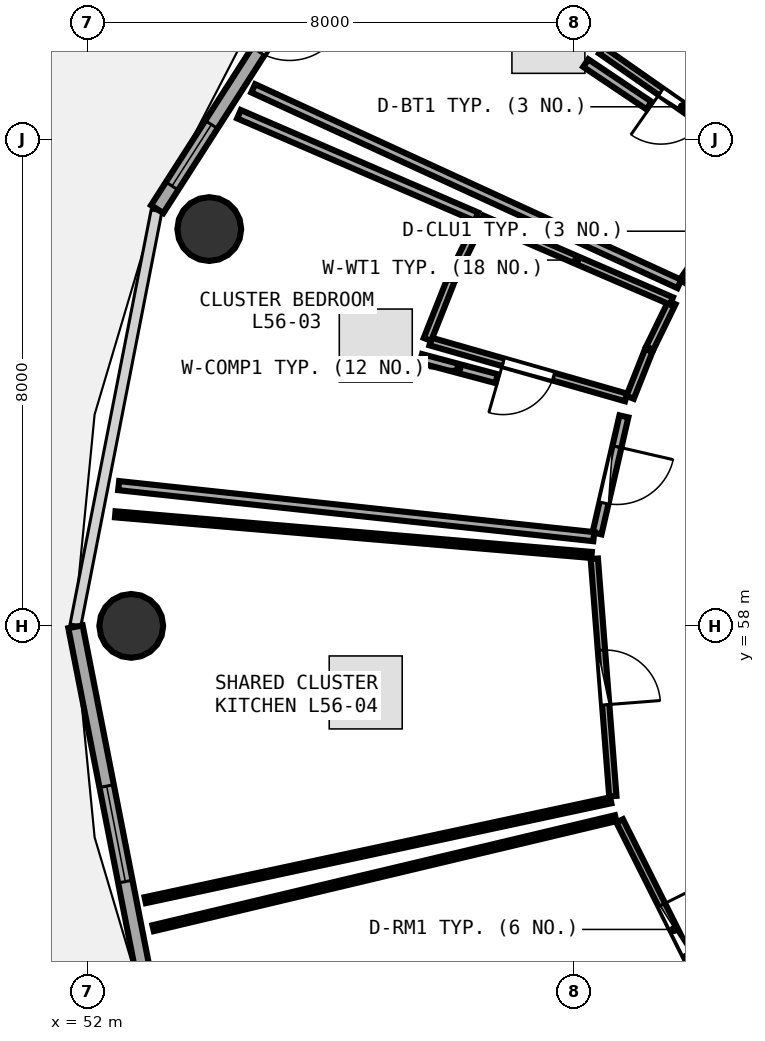
"""IFC4 building model, lengths in metres.
Left out: names, types, materials, properties, quantities, classifications, styles, units other than length and angle.
Written with IfcOpenShell. Run it as: python <this file> out.ifc"""

import sys

from ifc_helpers import new_model, si_unit, direction, frame, frame_2d, origin, origin_2d, place, context, subcontext, project, spatial, rectangle, circle, extrude, element, fill, save


model = new_model("IFC4")
c1 = context("Model", 3, precision=1e-05, world=origin(), true_north=direction((0.0, 1.0)))
c2 = subcontext(c1, "Body", "Model", "MODEL_VIEW")
j1 = project(units=[si_unit("LENGTHUNIT", "METRE"), si_unit("PLANEANGLEUNIT", "RADIAN")], contexts=[c1])
p1 = place(None, origin())
s1 = spatial("IfcSite", under=j1, at=p1, CompositionType="ELEMENT")
p2 = place(p1, origin())
s2 = spatial("IfcBuilding", under=s1, at=p2, CompositionType="ELEMENT")
p3 = place(p2, frame((0.0, 0.0, 219.45)))
s3 = spatial("IfcBuildingStorey", under=s2, at=p3, CompositionType="ELEMENT", Elevation=219.45)
for number, where, z_axis, x_axis in (
    (1, (54.003, 64.526, 0.0), (0.0, 0.0, 1.0), (1.0, 0.0, 0.0)),
    (2, (52.72, 58.0, 0.0), (0.0, 0.0, 1.0), (1.0, 0.0, 0.0)),
):
    element("IfcColumn", number, at=place(p3, frame(where, z_axis=z_axis, x_axis=x_axis)), inside=s3, PredefinedType="COLUMN", context=c2, shape_type="SweptSolid", body=[
        extrude(circle(Radius=0.525, at=origin_2d()), origin(), (0.0, 0.0, 1.0), 3.75),
    ])
p4 = place(p3, frame((56.986, 70.843, 0.0), z_axis=(0.0, 0.0, 1.0), x_axis=(-0.539539512973, -0.841960280501, 0.0)))
e3 = element("IfcWall", 3, at=p4, inside=s3, PredefinedType="SOLIDWALL", context=c2, shape_type="SweptSolid", body=[
    extrude(rectangle(XDim=7.115, YDim=0.24, at=frame_2d((3.557, 0.0))), origin(), (0.0, 0.0, 1.0), 3.475),
])
p5 = place(p4, frame((3.082, 0.0, 0.0)))
e4 = element("IfcOpeningElement", 4, at=p5, cuts=e3, PredefinedType="OPENING", context=c2, shape_type="SweptSolid", body=[
    extrude(rectangle(XDim=0.95, YDim=2.1, at=frame_2d((0.475, 1.05))), frame((0.0, 0.13, 0.0), z_axis=(0.0, -1.0, 0.0), x_axis=(1.0, 0.0, 0.0)), (0.0, 0.0, 1.0), 0.26),
])
p6 = place(p4, frame((5.462, 0.0, 0.85)))
e5 = element("IfcOpeningElement", 5, at=p6, cuts=e3, PredefinedType="OPENING", context=c2, shape_type="SweptSolid", body=[
    extrude(rectangle(XDim=1.2, YDim=1.45, at=frame_2d((0.6, 0.725))), frame((0.0, 0.13, 0.0), z_axis=(0.0, -1.0, 0.0), x_axis=(1.0, 0.0, 0.0)), (0.0, 0.0, 1.0), 0.26),
])
p7 = place(p3, frame((51.803, 57.985, 0.0), z_axis=(0.0, 0.0, 1.0), x_axis=(0.192069055673, -0.981381413036, 0.0)))
e6 = element("IfcWall", 6, at=p7, inside=s3, PredefinedType="SOLIDWALL", context=c2, shape_type="SweptSolid", body=[
    extrude(rectangle(XDim=6.94, YDim=0.24, at=frame_2d((3.47, 0.0))), origin(), (0.0, 0.0, 1.0), 3.475),
])
p8 = place(p7, frame((2.67, 0.0, 0.85)))
e7 = element("IfcOpeningElement", 7, at=p8, cuts=e6, PredefinedType="OPENING", context=c2, shape_type="SweptSolid", body=[
    extrude(rectangle(XDim=1.6, YDim=1.45, at=frame_2d((0.8, 0.725))), frame((0.0, 0.13, 0.0), z_axis=(0.0, -1.0, 0.0), x_axis=(1.0, 0.0, 0.0)), (0.0, 0.0, 1.0), 0.26),
])
p9 = place(p3, frame((63.115, 65.606, 0.0), z_axis=(0.0, 0.0, 1.0), x_axis=(-0.819768322712, 0.57269529165, 0.0)))
e8 = element("IfcWall", 8, at=p9, inside=s3, PredefinedType="PLUMBINGWALL", context=c2, shape_type="SweptSolid", body=[
    extrude(rectangle(XDim=3.248, YDim=0.13, at=frame_2d((1.624, 0.0))), origin(), (0.0, 0.0, 1.0), 3.175),
])
p10 = place(p9, frame((1.194, 0.0, 0.0)))
e9 = element("IfcOpeningElement", 9, at=p10, cuts=e8, PredefinedType="OPENING", context=c2, shape_type="SweptSolid", body=[
    extrude(rectangle(XDim=0.86, YDim=2.05, at=frame_2d((0.43, 1.025))), frame((0.0, 0.075, 0.0), z_axis=(0.0, -1.0, 0.0), x_axis=(1.0, 0.0, 0.0)), (0.0, 0.0, 1.0), 0.15),
])
p11 = place(p3, frame((62.963, 65.326, 0.0), z_axis=(0.0, 0.0, 1.0), x_axis=(-0.569634666298, -0.821898014933, 0.0)))
e10 = element("IfcWall", 10, at=p11, inside=s3, PredefinedType="PARTITIONING", context=c2, shape_type="SweptSolid", body=[
    extrude(rectangle(XDim=2.032, YDim=0.15, at=frame_2d((1.016, 0.0))), origin(), (0.0, 0.0, 1.0), 3.025),
])
p12 = place(p11, frame((0.541, 0.0, 0.0)))
e11 = element("IfcOpeningElement", 11, at=p12, cuts=e10, PredefinedType="OPENING", context=c2, shape_type="SweptSolid", body=[
    extrude(rectangle(XDim=0.95, YDim=2.08, at=frame_2d((0.475, 1.04))), frame((0.0, 0.085, 0.0), z_axis=(0.0, -1.0, 0.0), x_axis=(1.0, 0.0, 0.0)), (0.0, 0.0, 1.0), 0.17),
])
p13 = place(p3, frame((60.859, 61.757, 0.0), z_axis=(0.0, 0.0, 1.0), x_axis=(-0.961479890051, 0.274875282679, 0.0)))
e12 = element("IfcWall", 12, at=p13, inside=s3, PredefinedType="PLUMBINGWALL", context=c2, shape_type="SweptSolid", body=[
    extrude(rectangle(XDim=3.347, YDim=0.13, at=frame_2d((1.673, 0.0))), origin(), (0.0, 0.0, 1.0), 3.175),
])
p14 = place(p13, frame((1.243, 0.0, 0.0)))
e13 = element("IfcOpeningElement", 13, at=p14, cuts=e12, PredefinedType="OPENING", context=c2, shape_type="SweptSolid", body=[
    extrude(rectangle(XDim=0.86, YDim=2.05, at=frame_2d((0.43, 1.025))), frame((0.0, 0.075, 0.0), z_axis=(0.0, -1.0, 0.0), x_axis=(1.0, 0.0, 0.0)), (0.0, 0.0, 1.0), 0.15),
])
p15 = place(p3, frame((60.823, 61.446, 0.0), z_axis=(0.0, 0.0, 1.0), x_axis=(-0.223956243079, -0.97459920028, 0.0)))
e14 = element("IfcWall", 14, at=p15, inside=s3, PredefinedType="PARTITIONING", context=c2, shape_type="SweptSolid", body=[
    extrude(rectangle(XDim=1.974, YDim=0.15, at=frame_2d((0.987, 0.0))), origin(), (0.0, 0.0, 1.0), 3.48),
])
p16 = place(p15, frame((0.512, 0.0, 0.0)))
e15 = element("IfcOpeningElement", 15, at=p16, cuts=e14, PredefinedType="OPENING", context=c2, shape_type="SweptSolid", body=[
    extrude(rectangle(XDim=0.95, YDim=2.08, at=frame_2d((0.475, 1.04))), frame((0.0, 0.085, 0.0), z_axis=(0.0, -1.0, 0.0), x_axis=(1.0, 0.0, 0.0)), (0.0, 0.0, 1.0), 0.17),
])
p17 = place(p3, frame((60.336, 59.103, 0.0), z_axis=(0.0, 0.0, 1.0), x_axis=(0.07781697677, -0.996967661525, 0.0)))
e16 = element("IfcWall", 16, at=p17, inside=s3, PredefinedType="PARTITIONING", context=c2, shape_type="SweptSolid", body=[
    extrude(rectangle(XDim=3.916, YDim=0.12, at=frame_2d((1.958, 0.0))), origin(), (0.0, 0.0, 1.0), 3.025),
])
p18 = place(p17, frame((1.508, 0.0, 0.0)))
e17 = element("IfcOpeningElement", 17, at=p18, cuts=e16, PredefinedType="OPENING", context=c2, shape_type="SweptSolid", body=[
    extrude(rectangle(XDim=0.9, YDim=2.08, at=frame_2d((0.45, 1.04))), frame((0.0, 0.07, 0.0), z_axis=(0.0, -1.0, 0.0), x_axis=(1.0, 0.0, 0.0)), (0.0, 0.0, 1.0), 0.14),
])
p19 = place(p3, frame((60.753, 54.793, 0.0), z_axis=(0.0, 0.0, 1.0), x_axis=(0.448191244457, -0.893937698272, 0.0)))
e18 = element("IfcWall", 18, at=p19, inside=s3, PredefinedType="PARTITIONING", context=c2, shape_type="SweptSolid", body=[
    extrude(rectangle(XDim=3.994, YDim=0.12, at=frame_2d((1.997, 0.0))), origin(), (0.0, 0.0, 1.0), 3.025),
])
p20 = place(p19, frame((1.547, 0.0, 0.0)))
e19 = element("IfcOpeningElement", 19, at=p20, cuts=e18, PredefinedType="OPENING", context=c2, shape_type="SweptSolid", body=[
    extrude(rectangle(XDim=0.9, YDim=2.08, at=frame_2d((0.45, 1.04))), frame((0.0, 0.07, 0.0), z_axis=(0.0, -1.0, 0.0), x_axis=(1.0, 0.0, 0.0)), (0.0, 0.0, 1.0), 0.14),
])
p21 = place(p3, frame((64.655, 67.085, 0.0), z_axis=(0.0, 0.0, 1.0), x_axis=(-0.716418161924, 0.697671138335, 0.0)))
e20 = element("IfcWall", 20, at=p21, inside=s3, PredefinedType="PARTITIONING", context=c2, shape_type="SweptSolid", body=[
    extrude(rectangle(XDim=7.449, YDim=0.15, at=frame_2d((3.725, 0.0))), origin(), (0.0, 0.0, 1.0), 3.075),
])
p22 = place(p3, frame((61.735, 63.623, 0.0), z_axis=(0.0, 0.0, 1.0), x_axis=(-0.908799831152, 0.417232389561, 0.0)))
e21 = element("IfcWall", 21, at=p22, inside=s3, PredefinedType="PARTITIONING", context=c2, shape_type="SweptSolid", body=[
    extrude(rectangle(XDim=7.712, YDim=0.15, at=frame_2d((3.856, 0.0))), origin(), (0.0, 0.0, 1.0), 3.025),
])
p23 = place(p3, frame((60.195, 67.256, 0.0), z_axis=(0.0, 0.0, 1.0), x_axis=(0.830279043522, -0.557347925347, 0.0)))
e22 = element("IfcWall", 22, at=p23, inside=s3, PredefinedType="PARTITIONING", context=c2, shape_type="SweptSolid", body=[
    extrude(rectangle(XDim=1.254, YDim=0.15, at=frame_2d((0.627, 0.0))), origin(), (0.0, 0.0, 1.0), 3.175),
])
p24 = place(p3, frame((61.613, 63.318, 0.0), z_axis=(0.0, 0.0, 1.0), x_axis=(-0.437484879269, -0.899225767208, 0.0)))
e23 = element("IfcWall", 23, at=p24, inside=s3, PredefinedType="PLUMBINGWALL", context=c2, shape_type="SweptSolid", body=[
    extrude(rectangle(XDim=0.835, YDim=0.13, at=frame_2d((0.418, 0.0))), origin(), (0.0, 0.0, 1.0), 3.235),
])
p25 = place(p3, frame((61.232, 62.531, 0.0), z_axis=(0.0, 0.0, 1.0), x_axis=(-0.369921104598, -0.929063171358, 0.0)))
e24 = element("IfcWall", 24, at=p25, inside=s3, PredefinedType="PLUMBINGWALL", context=c2, shape_type="SweptSolid", body=[
    extrude(rectangle(XDim=0.831, YDim=0.13, at=frame_2d((0.416, 0.0))), origin(), (0.0, 0.0, 1.0), 3.235),
])
p26 = place(p3, frame((57.591, 62.712, 0.0), z_axis=(0.0, 0.0, 1.0), x_axis=(0.368988727478, 0.929433870157, 0.0)))
e25 = element("IfcWall", 25, at=p26, inside=s3, PredefinedType="PLUMBINGWALL", context=c2, shape_type="SweptSolid", body=[
    extrude(rectangle(XDim=1.052, YDim=0.13, at=frame_2d((0.526, 0.0))), origin(), (0.0, 0.0, 1.0), 3.48),
])
p27 = place(p3, frame((57.996, 63.726, 0.0), z_axis=(0.0, 0.0, 1.0), x_axis=(0.438432715101, 0.898764014816, 0.0)))
e26 = element("IfcWall", 26, at=p27, inside=s3, PredefinedType="PLUMBINGWALL", context=c2, shape_type="SweptSolid", body=[
    extrude(rectangle(XDim=1.059, YDim=0.13, at=frame_2d((0.53, 0.0))), origin(), (0.0, 0.0, 1.0), 3.025),
])
p28 = place(p3, frame((58.487, 64.688, 0.0), z_axis=(0.0, 0.0, 1.0), x_axis=(0.918238400885, -0.396028078727, 0.0)))
e27 = element("IfcWall", 27, at=p28, inside=s3, PredefinedType="PLUMBINGWALL", context=c2, shape_type="SweptSolid", body=[
    extrude(rectangle(XDim=3.394, YDim=0.13, at=frame_2d((1.697, 0.0))), origin(), (0.0, 0.0, 1.0), 3.025),
])
p29 = place(p3, frame((60.327, 59.467, 0.0), z_axis=(0.0, 0.0, 1.0), x_axis=(-0.994280915129, 0.10679635673, 0.0)))
e28 = element("IfcWall", 28, at=p29, inside=s3, PredefinedType="PARTITIONING", context=c2, shape_type="SweptSolid", body=[
    extrude(rectangle(XDim=7.859, YDim=0.15, at=frame_2d((3.93, 0.0))), origin(), (0.0, 0.0, 1.0), 3.075),
])
p30 = place(p3, frame((54.492, 66.414, 0.0), z_axis=(0.0, 0.0, 1.0), x_axis=(0.918147334224, -0.396239160934, 0.0)))
e29 = element("IfcWall", 29, at=p30, inside=s3, PredefinedType="PARTITIONING", context=c2, shape_type="SweptSolid", body=[
    extrude(rectangle(XDim=4.253, YDim=0.15, at=frame_2d((2.126, 0.0))), origin(), (0.0, 0.0, 1.0), 3.025),
])
p31 = place(p3, frame((57.483, 62.398, 0.0), z_axis=(0.0, 0.0, 1.0), x_axis=(0.966263202112, -0.257556642788, 0.0)))
e30 = element("IfcWall", 30, at=p31, inside=s3, PredefinedType="PARTITIONING", context=c2, shape_type="SweptSolid", body=[
    extrude(rectangle(XDim=1.29, YDim=0.15, at=frame_2d((0.645, 0.0))), origin(), (0.0, 0.0, 1.0), 3.175),
])
p32 = place(p3, frame((60.606, 55.132, 0.0), z_axis=(0.0, 0.0, 1.0), x_axis=(-0.977761328162, -0.209720731335, 0.0)))
e31 = element("IfcWall", 31, at=p32, inside=s3, PredefinedType="PARTITIONING", context=c2, shape_type="SweptSolid", body=[
    extrude(rectangle(XDim=7.83, YDim=0.1, at=frame_2d((3.915, 0.0))), origin(), (0.0, 0.0, 1.0), 3.075),
])
p33 = place(p3, frame((52.457, 59.835, 0.0), z_axis=(0.0, 0.0, 1.0), x_axis=(0.996382192496, -0.084985448623, 0.0)))
e32 = element("IfcWall", 32, at=p33, inside=s3, PredefinedType="PARTITIONING", context=c2, shape_type="SweptSolid", body=[
    extrude(rectangle(XDim=7.863, YDim=0.1, at=frame_2d((3.931, 0.0))), origin(), (0.0, 0.0, 1.0), 3.075),
])
p34 = place(p3, frame((53.08, 53.028, 0.0), z_axis=(0.0, 0.0, 1.0), x_axis=(0.972861128156, 0.231389769272, 0.0)))
e33 = element("IfcWall", 33, at=p34, inside=s3, PredefinedType="PARTITIONING", context=c2, shape_type="SweptSolid", body=[
    extrude(rectangle(XDim=7.819, YDim=0.1, at=frame_2d((3.91, 0.0))), origin(), (0.0, 0.0, 1.0), 3.075),
])
p35 = place(p6, origin())
e34 = element("IfcWindow", 34, at=p35, inside=s3, PartitioningType="SINGLE_PANEL", PredefinedType="WINDOW", context=c2, shape_type="SweptSolid", body=[
    extrude(rectangle(XDim=1.2, YDim=1.45, at=frame_2d((0.6, 0.725))), frame((0.0, 0.03, 0.0), z_axis=(0.0, -1.0, 0.0), x_axis=(1.0, 0.0, 0.0)), (0.0, 0.0, 1.0), 0.06),
])
fill(e5, e34)
p36 = place(p8, origin())
e35 = element("IfcWindow", 35, at=p36, inside=s3, PartitioningType="SINGLE_PANEL", PredefinedType="WINDOW", context=c2, shape_type="SweptSolid", body=[
    extrude(rectangle(XDim=1.6, YDim=1.45, at=frame_2d((0.8, 0.725))), frame((0.0, 0.03, 0.0), z_axis=(0.0, -1.0, 0.0), x_axis=(1.0, 0.0, 0.0)), (0.0, 0.0, 1.0), 0.06),
])
fill(e7, e35)
p37 = place(p10, origin())
e36 = element("IfcDoor", 36, at=p37, inside=s3, OperationType="SINGLE_SWING_RIGHT", PredefinedType="DOOR", context=c2, shape_type="SweptSolid", body=[
    extrude(rectangle(XDim=0.86, YDim=2.05, at=frame_2d((0.43, 1.025))), frame((0.0, 0.025, 0.0), z_axis=(0.0, -1.0, 0.0), x_axis=(1.0, 0.0, 0.0)), (0.0, 0.0, 1.0), 0.05),
])
fill(e9, e36)
p38 = place(p14, origin())
e37 = element("IfcDoor", 37, at=p38, inside=s3, OperationType="SINGLE_SWING_RIGHT", PredefinedType="DOOR", context=c2, shape_type="SweptSolid", body=[
    extrude(rectangle(XDim=0.86, YDim=2.05, at=frame_2d((0.43, 1.025))), frame((0.0, 0.025, 0.0), z_axis=(0.0, -1.0, 0.0), x_axis=(1.0, 0.0, 0.0)), (0.0, 0.0, 1.0), 0.05),
])
fill(e13, e37)
p39 = place(p16, origin())
e38 = element("IfcDoor", 38, at=p39, inside=s3, OperationType="SINGLE_SWING_LEFT", PredefinedType="DOOR", context=c2, shape_type="SweptSolid", body=[
    extrude(rectangle(XDim=0.95, YDim=2.08, at=frame_2d((0.475, 1.04))), frame((0.0, 0.025, 0.0), z_axis=(0.0, -1.0, 0.0), x_axis=(1.0, 0.0, 0.0)), (0.0, 0.0, 1.0), 0.05),
])
fill(e15, e38)
p40 = place(p18, origin())
e39 = element("IfcDoor", 39, at=p40, inside=s3, OperationType="SINGLE_SWING_RIGHT", PredefinedType="DOOR", context=c2, shape_type="SweptSolid", body=[
    extrude(rectangle(XDim=0.9, YDim=2.08, at=frame_2d((0.45, 1.04))), frame((0.0, 0.025, 0.0), z_axis=(0.0, -1.0, 0.0), x_axis=(1.0, 0.0, 0.0)), (0.0, 0.0, 1.0), 0.05),
])
fill(e17, e39)
p41 = place(p20, origin())
e40 = element("IfcDoor", 40, at=p41, inside=s3, OperationType="SINGLE_SWING_LEFT", PredefinedType="DOOR", context=c2, shape_type="SweptSolid", body=[
    extrude(rectangle(XDim=0.9, YDim=2.08, at=frame_2d((0.45, 1.04))), frame((0.0, 0.025, 0.0), z_axis=(0.0, -1.0, 0.0), x_axis=(1.0, 0.0, 0.0)), (0.0, 0.0, 1.0), 0.05),
])
fill(e19, e40)
save(model, sys.argv[1])
